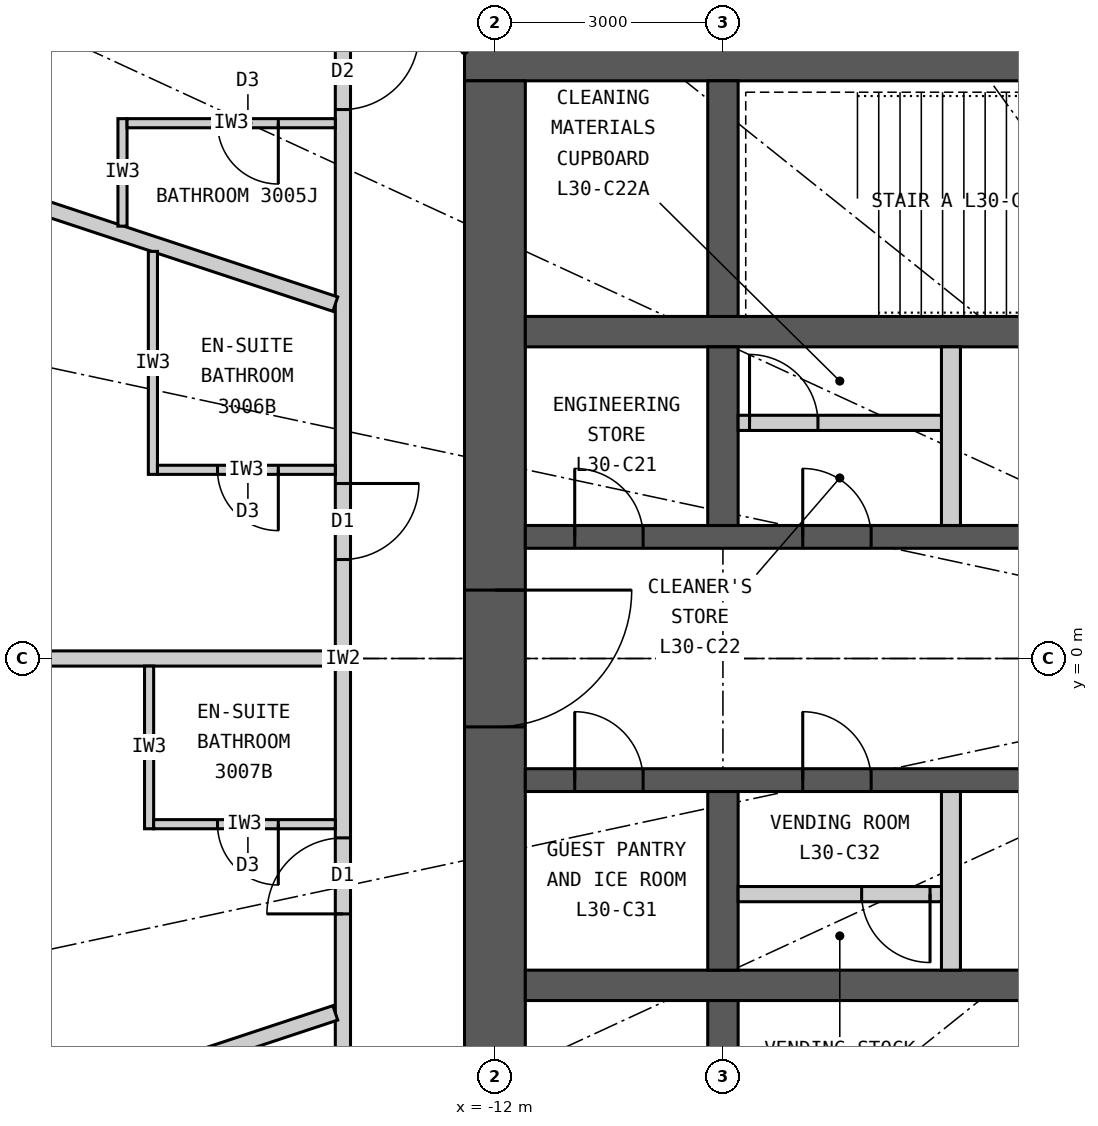
"""IFC4 building model, lengths in metres.
Left out: names, types, materials, properties, quantities, classifications, styles, units other than length and angle.
Written with IfcOpenShell. Run it as: python <this file> out.ifc"""

import sys

from ifc_helpers import new_model, si_unit, direction, frame, frame_2d, origin, place, context, subcontext, project, spatial, rectangle, extrude, element, fill, save


model = new_model("IFC4")
c1 = context("Model", 3, precision=1e-05, world=origin(), true_north=direction((0.0, 1.0)))
c2 = subcontext(c1, "Body", "Model", "MODEL_VIEW")
j1 = project(units=[si_unit("LENGTHUNIT", "METRE"), si_unit("PLANEANGLEUNIT", "RADIAN")], contexts=[c1])
p1 = place(None, origin())
s1 = spatial("IfcSite", under=j1, at=p1, CompositionType="ELEMENT")
p2 = place(p1, origin())
s2 = spatial("IfcBuilding", under=s1, at=p2, CompositionType="ELEMENT")
p3 = place(p2, frame((0.0, 0.0, 118.8)))
s3 = spatial("IfcBuildingStorey", under=s2, at=p3, CompositionType="ELEMENT", Elevation=118.8)
p4 = place(p3, frame((-12.4, 8.0, 0.0), z_axis=(0.0, 0.0, 1.0), x_axis=(1.0, 0.0, 0.0)))
e1 = element("IfcWall", 1, at=p4, inside=s3, PredefinedType="SHEAR", context=c2, shape_type="SweptSolid", body=[
    extrude(rectangle(XDim=24.8, YDim=0.8, at=frame_2d((12.4, 0.0))), origin(), (0.0, 0.0, 1.0), 3.3),
])
p5 = place(p4, frame((11.1, 0.0, 0.0)))
e2 = element("IfcOpeningElement", 2, at=p5, cuts=e1, PredefinedType="OPENING", context=c2, shape_type="SweptSolid", body=[
    extrude(rectangle(XDim=1.2, YDim=2.2, at=frame_2d((0.6, 1.1))), frame((0.0, 0.41, 0.0), z_axis=(0.0, -1.0, 0.0), x_axis=(1.0, 0.0, 0.0)), (0.0, 0.0, 1.0), 0.82),
])
p6 = place(p4, frame((18.7, 0.0, 0.0)))
e3 = element("IfcOpeningElement", 3, at=p6, cuts=e1, PredefinedType="OPENING", context=c2, shape_type="SweptSolid", body=[
    extrude(rectangle(XDim=0.9, YDim=2.2, at=frame_2d((0.45, 1.1))), frame((0.0, 0.41, 0.0), z_axis=(0.0, -1.0, 0.0), x_axis=(1.0, 0.0, 0.0)), (0.0, 0.0, 1.0), 0.82),
])
p7 = place(p3, frame((-12.0, 7.6, 0.0), z_axis=(0.0, 0.0, 1.0), x_axis=(0.0, -1.0, 0.0)))
e4 = element("IfcWall", 4, at=p7, inside=s3, PredefinedType="SHEAR", context=c2, shape_type="SweptSolid", body=[
    extrude(rectangle(XDim=15.2, YDim=0.8, at=frame_2d((7.6, 0.0))), origin(), (0.0, 0.0, 1.0), 3.3),
])
p8 = place(p7, frame((6.7, 0.0, 0.0)))
e5 = element("IfcOpeningElement", 5, at=p8, cuts=e4, PredefinedType="OPENING", context=c2, shape_type="SweptSolid", body=[
    extrude(rectangle(XDim=1.8, YDim=2.2, at=frame_2d((0.9, 1.1))), frame((0.0, 0.41, 0.0), z_axis=(0.0, -1.0, 0.0), x_axis=(1.0, 0.0, 0.0)), (0.0, 0.0, 1.0), 0.82),
])
p9 = place(p3, frame((-11.6, 4.3, 0.0), z_axis=(0.0, 0.0, 1.0), x_axis=(1.0, 0.0, 0.0)))
e6 = element("IfcWall", 6, at=p9, inside=s3, PredefinedType="SHEAR", context=c2, shape_type="SweptSolid", body=[
    extrude(rectangle(XDim=23.2, YDim=0.4, at=frame_2d((11.6, 0.0))), origin(), (0.0, 0.0, 1.0), 3.3),
])
p10 = place(p3, frame((-11.6, 1.6, 0.0), z_axis=(0.0, 0.0, 1.0), x_axis=(1.0, 0.0, 0.0)))
e7 = element("IfcWall", 7, at=p10, inside=s3, PredefinedType="SHEAR", context=c2, shape_type="SweptSolid", body=[
    extrude(rectangle(XDim=23.2, YDim=0.3, at=frame_2d((11.6, 0.0))), origin(), (0.0, 0.0, 1.0), 3.3),
])
p11 = place(p10, frame((6.55, 0.0, 0.0)))
e8 = element("IfcOpeningElement", 8, at=p11, cuts=e7, PredefinedType="OPENING", context=c2, shape_type="SweptSolid", body=[
    extrude(rectangle(XDim=1.1, YDim=2.2, at=frame_2d((0.55, 1.1))), frame((0.0, 0.16, 0.0), z_axis=(0.0, -1.0, 0.0), x_axis=(1.0, 0.0, 0.0)), (0.0, 0.0, 1.0), 0.32),
])
p12 = place(p10, frame((0.65, 0.0, 0.0)))
e9 = element("IfcOpeningElement", 9, at=p12, cuts=e7, PredefinedType="OPENING", context=c2, shape_type="SweptSolid", body=[
    extrude(rectangle(XDim=0.9, YDim=2.2, at=frame_2d((0.45, 1.1))), frame((0.0, 0.16, 0.0), z_axis=(0.0, -1.0, 0.0), x_axis=(1.0, 0.0, 0.0)), (0.0, 0.0, 1.0), 0.32),
])
p13 = place(p10, frame((3.65, 0.0, 0.0)))
e10 = element("IfcOpeningElement", 10, at=p13, cuts=e7, PredefinedType="OPENING", context=c2, shape_type="SweptSolid", body=[
    extrude(rectangle(XDim=0.9, YDim=2.2, at=frame_2d((0.45, 1.1))), frame((0.0, 0.16, 0.0), z_axis=(0.0, -1.0, 0.0), x_axis=(1.0, 0.0, 0.0)), (0.0, 0.0, 1.0), 0.32),
])
p14 = place(p10, frame((21.65, 0.0, 0.0)))
e11 = element("IfcOpeningElement", 11, at=p14, cuts=e7, PredefinedType="OPENING", context=c2, shape_type="SweptSolid", body=[
    extrude(rectangle(XDim=0.9, YDim=2.2, at=frame_2d((0.45, 1.1))), frame((0.0, 0.16, 0.0), z_axis=(0.0, -1.0, 0.0), x_axis=(1.0, 0.0, 0.0)), (0.0, 0.0, 1.0), 0.32),
])
p15 = place(p3, frame((-11.6, -4.3, 0.0), z_axis=(0.0, 0.0, 1.0), x_axis=(1.0, 0.0, 0.0)))
e12 = element("IfcWall", 12, at=p15, inside=s3, PredefinedType="SHEAR", context=c2, shape_type="SweptSolid", body=[
    extrude(rectangle(XDim=23.2, YDim=0.4, at=frame_2d((11.6, 0.0))), origin(), (0.0, 0.0, 1.0), 3.3),
])
p16 = place(p3, frame((-11.6, -1.6, 0.0), z_axis=(0.0, 0.0, 1.0), x_axis=(1.0, 0.0, 0.0)))
e13 = element("IfcWall", 13, at=p16, inside=s3, PredefinedType="SHEAR", context=c2, shape_type="SweptSolid", body=[
    extrude(rectangle(XDim=23.2, YDim=0.3, at=frame_2d((11.6, 0.0))), origin(), (0.0, 0.0, 1.0), 3.3),
])
p17 = place(p16, frame((6.55, 0.0, 0.0)))
e14 = element("IfcOpeningElement", 14, at=p17, cuts=e13, PredefinedType="OPENING", context=c2, shape_type="SweptSolid", body=[
    extrude(rectangle(XDim=1.1, YDim=2.2, at=frame_2d((0.55, 1.1))), frame((0.0, 0.16, 0.0), z_axis=(0.0, -1.0, 0.0), x_axis=(1.0, 0.0, 0.0)), (0.0, 0.0, 1.0), 0.32),
])
p18 = place(p16, frame((15.3, 0.0, 0.0)))
e15 = element("IfcOpeningElement", 15, at=p18, cuts=e13, PredefinedType="OPENING", context=c2, shape_type="SweptSolid", body=[
    extrude(rectangle(XDim=1.6, YDim=2.4, at=frame_2d((0.8, 1.2))), frame((0.0, 0.16, 0.0), z_axis=(0.0, -1.0, 0.0), x_axis=(1.0, 0.0, 0.0)), (0.0, 0.0, 1.0), 0.32),
])
p19 = place(p16, frame((0.65, 0.0, 0.0)))
e16 = element("IfcOpeningElement", 16, at=p19, cuts=e13, PredefinedType="OPENING", context=c2, shape_type="SweptSolid", body=[
    extrude(rectangle(XDim=0.9, YDim=2.2, at=frame_2d((0.45, 1.1))), frame((0.0, 0.16, 0.0), z_axis=(0.0, -1.0, 0.0), x_axis=(1.0, 0.0, 0.0)), (0.0, 0.0, 1.0), 0.32),
])
p20 = place(p16, frame((3.65, 0.0, 0.0)))
e17 = element("IfcOpeningElement", 17, at=p20, cuts=e13, PredefinedType="OPENING", context=c2, shape_type="SweptSolid", body=[
    extrude(rectangle(XDim=0.9, YDim=2.2, at=frame_2d((0.45, 1.1))), frame((0.0, 0.16, 0.0), z_axis=(0.0, -1.0, 0.0), x_axis=(1.0, 0.0, 0.0)), (0.0, 0.0, 1.0), 0.32),
])
p21 = place(p16, frame((21.65, 0.0, 0.0)))
e18 = element("IfcOpeningElement", 18, at=p21, cuts=e13, PredefinedType="OPENING", context=c2, shape_type="SweptSolid", body=[
    extrude(rectangle(XDim=0.9, YDim=2.2, at=frame_2d((0.45, 1.1))), frame((0.0, 0.16, 0.0), z_axis=(0.0, -1.0, 0.0), x_axis=(1.0, 0.0, 0.0)), (0.0, 0.0, 1.0), 0.32),
])
p22 = place(p3, frame((-9.0, 4.5, 0.0), z_axis=(0.0, 0.0, 1.0), x_axis=(0.0, 1.0, 0.0)))
e19 = element("IfcWall", 19, at=p22, inside=s3, PredefinedType="SHEAR", context=c2, shape_type="SweptSolid", body=[
    extrude(rectangle(XDim=3.1, YDim=0.4, at=frame_2d((1.55, 0.0))), origin(), (0.0, 0.0, 1.0), 3.3),
])
for number, where, z_axis, x_axis in (
    (20, (-9.0, 1.75, 0.0), (0.0, 0.0, 1.0), (0.0, 1.0, 0.0)),
    (21, (-9.0, -4.1, 0.0), (0.0, 0.0, 1.0), (0.0, 1.0, 0.0)),
):
    element("IfcWall", number, at=place(p3, frame(where, z_axis=z_axis, x_axis=x_axis)), inside=s3, PredefinedType="SHEAR", context=c2, shape_type="SweptSolid", body=[
        extrude(rectangle(XDim=2.35, YDim=0.4, at=frame_2d((1.175, 0.0))), origin(), (0.0, 0.0, 1.0), 3.3),
    ])
p23 = place(p3, frame((-9.0, -7.6, 0.0), z_axis=(0.0, 0.0, 1.0), x_axis=(0.0, 1.0, 0.0)))
e22 = element("IfcWall", 22, at=p23, inside=s3, PredefinedType="SHEAR", context=c2, shape_type="SweptSolid", body=[
    extrude(rectangle(XDim=3.1, YDim=0.4, at=frame_2d((1.55, 0.0))), origin(), (0.0, 0.0, 1.0), 3.3),
])
for number, where, z_axis, x_axis in (
    (23, (-6.0, 1.75, 0.0), (0.0, 0.0, 1.0), (0.0, 1.0, 0.0)),
    (24, (-6.0, -4.1, 0.0), (0.0, 0.0, 1.0), (0.0, 1.0, 0.0)),
):
    element("IfcWall", number, at=place(p3, frame(where, z_axis=z_axis, x_axis=x_axis)), inside=s3, PredefinedType="PARTITIONING", context=c2, shape_type="SweptSolid", body=[
        extrude(rectangle(XDim=2.35, YDim=0.25, at=frame_2d((1.175, 0.0))), origin(), (0.0, 0.0, 1.0), 3.3),
    ])
p24 = place(p3, frame((-14.0, 9.9, 0.0), z_axis=(0.0, 0.0, 1.0), x_axis=(0.0, -1.0, 0.0)))
e25 = element("IfcWall", 25, at=p24, inside=s3, PredefinedType="PARTITIONING", context=c2, shape_type="SweptSolid", body=[
    extrude(rectangle(XDim=19.8, YDim=0.2, at=frame_2d((9.9, 0.0))), origin(), (0.0, 0.0, 1.0), 3.12),
])
p25 = place(p24, frame((1.678, 0.0, 0.0)))
e26 = element("IfcOpeningElement", 26, at=p25, cuts=e25, PredefinedType="OPENING", context=c2, shape_type="SweptSolid", body=[
    extrude(rectangle(XDim=1.0, YDim=2.2, at=frame_2d((0.5, 1.1))), frame((0.0, 0.11, 0.0), z_axis=(0.0, -1.0, 0.0), x_axis=(1.0, 0.0, 0.0)), (0.0, 0.0, 1.0), 0.22),
])
p26 = place(p24, frame((7.598, 0.0, 0.0)))
e27 = element("IfcOpeningElement", 27, at=p26, cuts=e25, PredefinedType="OPENING", context=c2, shape_type="SweptSolid", body=[
    extrude(rectangle(XDim=1.0, YDim=2.2, at=frame_2d((0.5, 1.1))), frame((0.0, 0.11, 0.0), z_axis=(0.0, -1.0, 0.0), x_axis=(1.0, 0.0, 0.0)), (0.0, 0.0, 1.0), 0.22),
])
p27 = place(p24, frame((12.26, 0.0, 0.0)))
e28 = element("IfcOpeningElement", 28, at=p27, cuts=e25, PredefinedType="OPENING", context=c2, shape_type="SweptSolid", body=[
    extrude(rectangle(XDim=1.0, YDim=2.2, at=frame_2d((0.5, 1.1))), frame((0.0, 0.11, 0.0), z_axis=(0.0, -1.0, 0.0), x_axis=(1.0, 0.0, 0.0)), (0.0, 0.0, 1.0), 0.22),
])
p28 = place(p24, frame((16.922, 0.0, 0.0)))
e29 = element("IfcOpeningElement", 29, at=p28, cuts=e25, PredefinedType="OPENING", context=c2, shape_type="SweptSolid", body=[
    extrude(rectangle(XDim=1.0, YDim=2.2, at=frame_2d((0.5, 1.1))), frame((0.0, 0.11, 0.0), z_axis=(0.0, -1.0, 0.0), x_axis=(1.0, 0.0, 0.0)), (0.0, 0.0, 1.0), 0.22),
])
p29 = place(p3, frame((-14.1, 4.662, 0.0), z_axis=(0.0, 0.0, 1.0), x_axis=(-0.949446466373, 0.313928984789, 0.0)))
e30 = element("IfcWall", 30, at=p29, inside=s3, PredefinedType="PARTITIONING", context=c2, shape_type="SweptSolid", body=[
    extrude(rectangle(XDim=8.797, YDim=0.2, at=frame_2d((4.399, 0.0))), origin(), (0.0, 0.0, 1.0), 3.12),
])
p30 = place(p3, frame((-14.1, 0.0, 0.0), z_axis=(0.0, 0.0, 1.0), x_axis=(-1.0, 0.0, 0.0)))
e31 = element("IfcWall", 31, at=p30, inside=s3, PredefinedType="PARTITIONING", context=c2, shape_type="SweptSolid", body=[
    extrude(rectangle(XDim=9.15, YDim=0.2, at=frame_2d((4.575, 0.0))), origin(), (0.0, 0.0, 1.0), 2.32),
])
p31 = place(p3, frame((-14.1, -4.662, 0.0), z_axis=(0.0, 0.0, 1.0), x_axis=(-0.949446466373, -0.313928984789, 0.0)))
e32 = element("IfcWall", 32, at=p31, inside=s3, PredefinedType="PARTITIONING", context=c2, shape_type="SweptSolid", body=[
    extrude(rectangle(XDim=8.797, YDim=0.2, at=frame_2d((4.399, 0.0))), origin(), (0.0, 0.0, 1.0), 3.12),
])
p32 = place(p3, frame((-16.9, 5.688, 0.0), z_axis=(0.0, 0.0, 1.0), x_axis=(0.0, 1.0, 0.0)))
e33 = element("IfcWall", 33, at=p32, inside=s3, PredefinedType="PARTITIONING", context=c2, shape_type="SweptSolid", body=[
    extrude(rectangle(XDim=1.414, YDim=0.12, at=frame_2d((0.707, 0.0))), origin(), (0.0, 0.0, 1.0), 3.12),
])
p33 = place(p3, frame((-14.1, 7.042, 0.0), z_axis=(0.0, 0.0, 1.0), x_axis=(-1.0, 0.0, 0.0)))
e34 = element("IfcWall", 34, at=p33, inside=s3, PredefinedType="PARTITIONING", context=c2, shape_type="SweptSolid", body=[
    extrude(rectangle(XDim=2.74, YDim=0.12, at=frame_2d((1.37, 0.0))), origin(), (0.0, 0.0, 1.0), 3.12),
])
p34 = place(p33, frame((0.75, 0.0, 0.0)))
e35 = element("IfcOpeningElement", 35, at=p34, cuts=e34, PredefinedType="OPENING", context=c2, shape_type="SweptSolid", body=[
    extrude(rectangle(XDim=0.8, YDim=2.1, at=frame_2d((0.4, 1.05))), frame((0.0, 0.07, 0.0), z_axis=(0.0, -1.0, 0.0), x_axis=(1.0, 0.0, 0.0)), (0.0, 0.0, 1.0), 0.14),
])
p35 = place(p3, frame((-16.5, 5.356, 0.0), z_axis=(0.0, 0.0, 1.0), x_axis=(0.0, -1.0, 0.0)))
e36 = element("IfcWall", 36, at=p35, inside=s3, PredefinedType="PARTITIONING", context=c2, shape_type="SweptSolid", body=[
    extrude(rectangle(XDim=2.934, YDim=0.12, at=frame_2d((1.467, 0.0))), origin(), (0.0, 0.0, 1.0), 3.12),
])
p36 = place(p3, frame((-14.1, 2.482, 0.0), z_axis=(0.0, 0.0, 1.0), x_axis=(-1.0, 0.0, 0.0)))
e37 = element("IfcWall", 37, at=p36, inside=s3, PredefinedType="PARTITIONING", context=c2, shape_type="SweptSolid", body=[
    extrude(rectangle(XDim=2.34, YDim=0.12, at=frame_2d((1.17, 0.0))), origin(), (0.0, 0.0, 1.0), 3.12),
])
p37 = place(p36, frame((0.75, 0.0, 0.0)))
e38 = element("IfcOpeningElement", 38, at=p37, cuts=e37, PredefinedType="OPENING", context=c2, shape_type="SweptSolid", body=[
    extrude(rectangle(XDim=0.8, YDim=2.1, at=frame_2d((0.4, 1.05))), frame((0.0, 0.07, 0.0), z_axis=(0.0, -1.0, 0.0), x_axis=(1.0, 0.0, 0.0)), (0.0, 0.0, 1.0), 0.14),
])
p38 = place(p3, frame((-16.55, -0.1, 0.0), z_axis=(0.0, 0.0, 1.0), x_axis=(0.0, -1.0, 0.0)))
e39 = element("IfcWall", 39, at=p38, inside=s3, PredefinedType="PARTITIONING", context=c2, shape_type="SweptSolid", body=[
    extrude(rectangle(XDim=2.14, YDim=0.12, at=frame_2d((1.07, 0.0))), origin(), (0.0, 0.0, 1.0), 3.12),
])
p39 = place(p3, frame((-14.1, -2.18, 0.0), z_axis=(0.0, 0.0, 1.0), x_axis=(-1.0, 0.0, 0.0)))
e40 = element("IfcWall", 40, at=p39, inside=s3, PredefinedType="PARTITIONING", context=c2, shape_type="SweptSolid", body=[
    extrude(rectangle(XDim=2.39, YDim=0.12, at=frame_2d((1.195, 0.0))), origin(), (0.0, 0.0, 1.0), 3.12),
])
p40 = place(p39, frame((0.75, 0.0, 0.0)))
e41 = element("IfcOpeningElement", 41, at=p40, cuts=e40, PredefinedType="OPENING", context=c2, shape_type="SweptSolid", body=[
    extrude(rectangle(XDim=0.8, YDim=2.1, at=frame_2d((0.4, 1.05))), frame((0.0, 0.07, 0.0), z_axis=(0.0, -1.0, 0.0), x_axis=(1.0, 0.0, 0.0)), (0.0, 0.0, 1.0), 0.14),
])
p41 = place(p3, frame((-8.8, 3.1, 0.0), z_axis=(0.0, 0.0, 1.0), x_axis=(1.0, 0.0, 0.0)))
e42 = element("IfcWall", 42, at=p41, inside=s3, PredefinedType="PARTITIONING", context=c2, shape_type="SweptSolid", body=[
    extrude(rectangle(XDim=2.675, YDim=0.2, at=frame_2d((1.337, 0.0))), origin(), (0.0, 0.0, 1.0), 3.12),
])
p42 = place(p41, frame((0.15, 0.0, 0.0)))
e43 = element("IfcOpeningElement", 43, at=p42, cuts=e42, PredefinedType="OPENING", context=c2, shape_type="SweptSolid", body=[
    extrude(rectangle(XDim=0.9, YDim=2.2, at=frame_2d((0.45, 1.1))), frame((0.0, 0.11, 0.0), z_axis=(0.0, -1.0, 0.0), x_axis=(1.0, 0.0, 0.0)), (0.0, 0.0, 1.0), 0.22),
])
p43 = place(p3, frame((-8.8, -3.1, 0.0), z_axis=(0.0, 0.0, 1.0), x_axis=(1.0, 0.0, 0.0)))
e44 = element("IfcWall", 44, at=p43, inside=s3, PredefinedType="PARTITIONING", context=c2, shape_type="SweptSolid", body=[
    extrude(rectangle(XDim=2.675, YDim=0.2, at=frame_2d((1.337, 0.0))), origin(), (0.0, 0.0, 1.0), 3.12),
])
p44 = place(p43, frame((1.625, 0.0, 0.0)))
e45 = element("IfcOpeningElement", 45, at=p44, cuts=e44, PredefinedType="OPENING", context=c2, shape_type="SweptSolid", body=[
    extrude(rectangle(XDim=0.9, YDim=2.2, at=frame_2d((0.45, 1.1))), frame((0.0, 0.11, 0.0), z_axis=(0.0, -1.0, 0.0), x_axis=(1.0, 0.0, 0.0)), (0.0, 0.0, 1.0), 0.22),
])
p45 = place(p34, origin())
e46 = element("IfcDoor", 46, at=p45, inside=s3, OperationType="SINGLE_SWING_LEFT", PredefinedType="DOOR", context=c2, shape_type="SweptSolid", body=[
    extrude(rectangle(XDim=0.8, YDim=2.1, at=frame_2d((0.4, 1.05))), frame((0.0, 0.025, 0.0), z_axis=(0.0, -1.0, 0.0), x_axis=(1.0, 0.0, 0.0)), (0.0, 0.0, 1.0), 0.05),
])
fill(e35, e46)
p46 = place(p25, origin())
e47 = element("IfcDoor", 47, at=p46, inside=s3, OperationType="SINGLE_SWING_LEFT", PredefinedType="DOOR", context=c2, shape_type="SweptSolid", body=[
    extrude(rectangle(XDim=1.0, YDim=2.2, at=frame_2d((0.5, 1.1))), frame((0.0, 0.025, 0.0), z_axis=(0.0, -1.0, 0.0), x_axis=(1.0, 0.0, 0.0)), (0.0, 0.0, 1.0), 0.05),
])
fill(e26, e47)
p47 = place(p37, origin())
e48 = element("IfcDoor", 48, at=p47, inside=s3, OperationType="SINGLE_SWING_LEFT", PredefinedType="DOOR", context=c2, shape_type="SweptSolid", body=[
    extrude(rectangle(XDim=0.8, YDim=2.1, at=frame_2d((0.4, 1.05))), frame((0.0, 0.025, 0.0), z_axis=(0.0, -1.0, 0.0), x_axis=(1.0, 0.0, 0.0)), (0.0, 0.0, 1.0), 0.05),
])
fill(e38, e48)
p48 = place(p26, origin())
e49 = element("IfcDoor", 49, at=p48, inside=s3, OperationType="SINGLE_SWING_LEFT", PredefinedType="DOOR", context=c2, shape_type="SweptSolid", body=[
    extrude(rectangle(XDim=1.0, YDim=2.2, at=frame_2d((0.5, 1.1))), frame((0.0, 0.025, 0.0), z_axis=(0.0, -1.0, 0.0), x_axis=(1.0, 0.0, 0.0)), (0.0, 0.0, 1.0), 0.05),
])
fill(e27, e49)
p49 = place(p40, origin())
e50 = element("IfcDoor", 50, at=p49, inside=s3, OperationType="SINGLE_SWING_LEFT", PredefinedType="DOOR", context=c2, shape_type="SweptSolid", body=[
    extrude(rectangle(XDim=0.8, YDim=2.1, at=frame_2d((0.4, 1.05))), frame((0.0, 0.025, 0.0), z_axis=(0.0, -1.0, 0.0), x_axis=(1.0, 0.0, 0.0)), (0.0, 0.0, 1.0), 0.05),
])
fill(e41, e50)
p50 = place(p27, origin())
e51 = element("IfcDoor", 51, at=p50, inside=s3, OperationType="SINGLE_SWING_RIGHT", PredefinedType="DOOR", context=c2, shape_type="SweptSolid", body=[
    extrude(rectangle(XDim=1.0, YDim=2.2, at=frame_2d((0.5, 1.1))), frame((0.0, 0.025, 0.0), z_axis=(0.0, -1.0, 0.0), x_axis=(1.0, 0.0, 0.0)), (0.0, 0.0, 1.0), 0.05),
])
fill(e28, e51)
p51 = place(p12, origin())
e52 = element("IfcDoor", 52, at=p51, inside=s3, OperationType="SINGLE_SWING_LEFT", PredefinedType="DOOR", context=c2, shape_type="SweptSolid", body=[
    extrude(rectangle(XDim=0.9, YDim=2.2, at=frame_2d((0.45, 1.1))), frame((0.0, 0.025, 0.0), z_axis=(0.0, -1.0, 0.0), x_axis=(1.0, 0.0, 0.0)), (0.0, 0.0, 1.0), 0.05),
])
fill(e9, e52)
p52 = place(p42, origin())
e53 = element("IfcDoor", 53, at=p52, inside=s3, OperationType="SINGLE_SWING_LEFT", PredefinedType="DOOR", context=c2, shape_type="SweptSolid", body=[
    extrude(rectangle(XDim=0.9, YDim=2.2, at=frame_2d((0.45, 1.1))), frame((0.0, 0.025, 0.0), z_axis=(0.0, -1.0, 0.0), x_axis=(1.0, 0.0, 0.0)), (0.0, 0.0, 1.0), 0.05),
])
fill(e43, e53)
p53 = place(p13, origin())
e54 = element("IfcDoor", 54, at=p53, inside=s3, OperationType="SINGLE_SWING_LEFT", PredefinedType="DOOR", context=c2, shape_type="SweptSolid", body=[
    extrude(rectangle(XDim=0.9, YDim=2.2, at=frame_2d((0.45, 1.1))), frame((0.0, 0.025, 0.0), z_axis=(0.0, -1.0, 0.0), x_axis=(1.0, 0.0, 0.0)), (0.0, 0.0, 1.0), 0.05),
])
fill(e10, e54)
p54 = place(p19, origin())
e55 = element("IfcDoor", 55, at=p54, inside=s3, OperationType="SINGLE_SWING_LEFT", PredefinedType="DOOR", context=c2, shape_type="SweptSolid", body=[
    extrude(rectangle(XDim=0.9, YDim=2.2, at=frame_2d((0.45, 1.1))), frame((0.0, 0.025, 0.0), z_axis=(0.0, -1.0, 0.0), x_axis=(1.0, 0.0, 0.0)), (0.0, 0.0, 1.0), 0.05),
])
fill(e16, e55)
p55 = place(p44, origin())
e56 = element("IfcDoor", 56, at=p55, inside=s3, OperationType="SINGLE_SWING_RIGHT", PredefinedType="DOOR", context=c2, shape_type="SweptSolid", body=[
    extrude(rectangle(XDim=0.9, YDim=2.2, at=frame_2d((0.45, 1.1))), frame((0.0, 0.025, 0.0), z_axis=(0.0, -1.0, 0.0), x_axis=(1.0, 0.0, 0.0)), (0.0, 0.0, 1.0), 0.05),
])
fill(e45, e56)
p56 = place(p20, origin())
e57 = element("IfcDoor", 57, at=p56, inside=s3, OperationType="SINGLE_SWING_LEFT", PredefinedType="DOOR", context=c2, shape_type="SweptSolid", body=[
    extrude(rectangle(XDim=0.9, YDim=2.2, at=frame_2d((0.45, 1.1))), frame((0.0, 0.025, 0.0), z_axis=(0.0, -1.0, 0.0), x_axis=(1.0, 0.0, 0.0)), (0.0, 0.0, 1.0), 0.05),
])
fill(e17, e57)
p57 = place(p8, origin())
e58 = element("IfcDoor", 58, at=p57, inside=s3, OperationType="DOUBLE_DOOR_DOUBLE_SWING", PredefinedType="DOOR", context=c2, shape_type="SweptSolid", body=[
    extrude(rectangle(XDim=1.8, YDim=2.2, at=frame_2d((0.9, 1.1))), frame((0.0, 0.025, 0.0), z_axis=(0.0, -1.0, 0.0), x_axis=(1.0, 0.0, 0.0)), (0.0, 0.0, 1.0), 0.05),
])
fill(e5, e58)
save(model, sys.argv[1])
